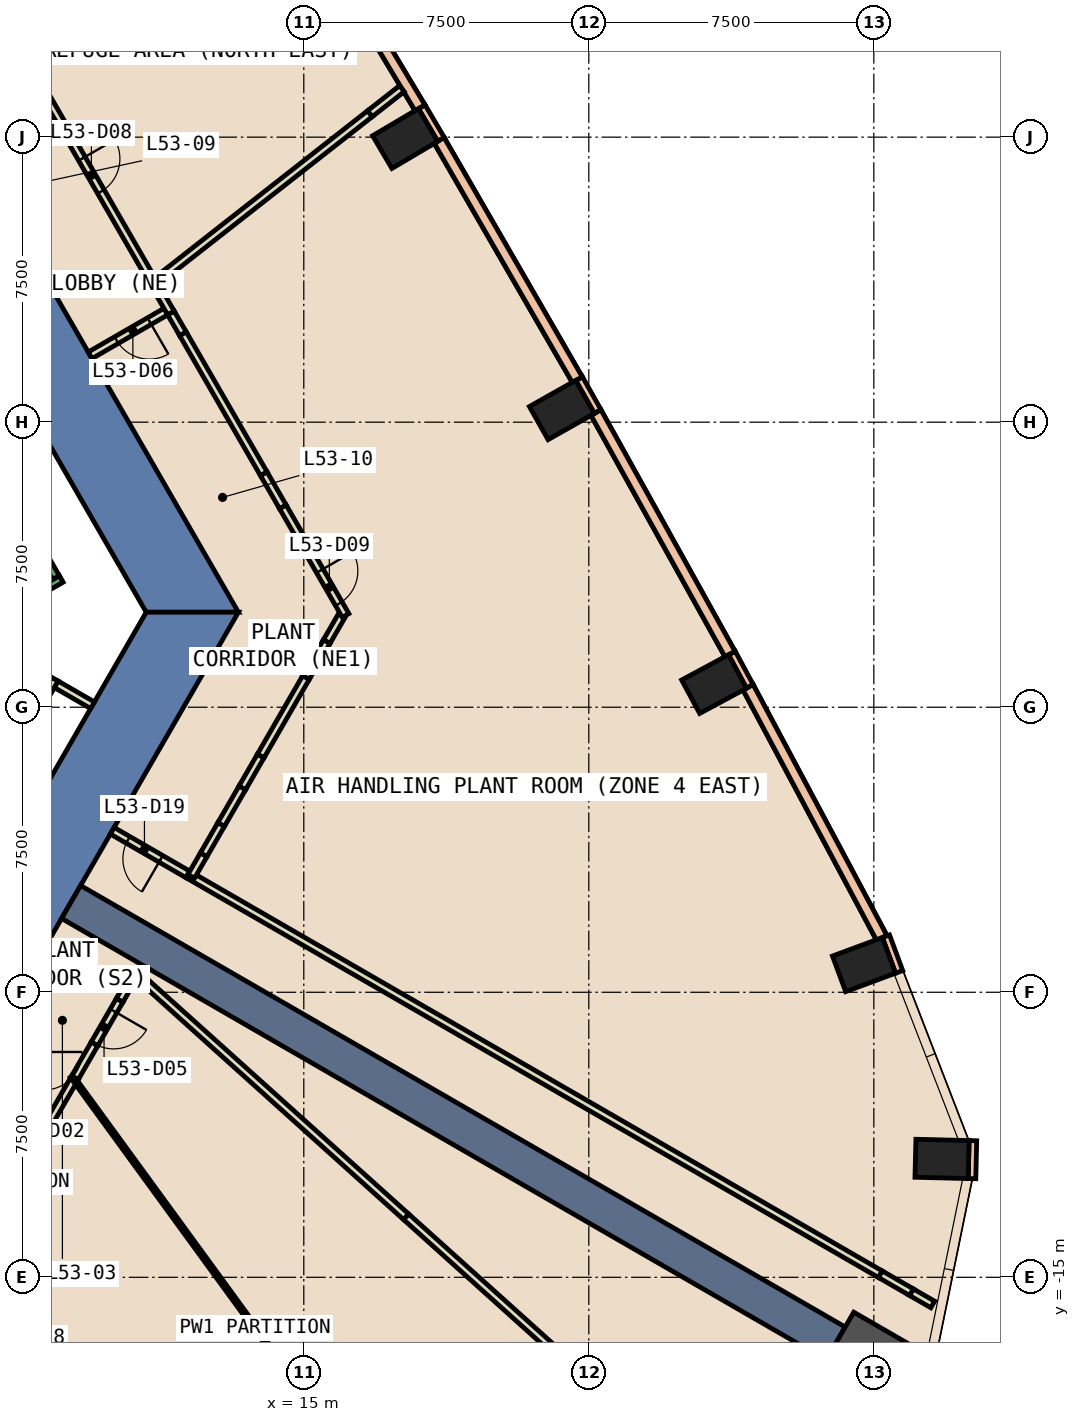
"""IFC4 building model, lengths in metres.
Left out: names, types, materials, properties, quantities, classifications, styles, units other than length and angle.
Written with IfcOpenShell. Run it as: python <this file> out.ifc"""

import sys

from ifc_helpers import new_model, si_unit, direction, frame, frame_2d, origin, origin_2d, place, context, subcontext, project, spatial, polyline, rectangle, outline, extrude, element, fill, save


model = new_model("IFC4")
c1 = context("Model", 3, precision=1e-05, world=origin(), true_north=direction((0.0, 1.0)))
c2 = subcontext(c1, "Body", "Model", "MODEL_VIEW")
j1 = project(units=[si_unit("LENGTHUNIT", "METRE"), si_unit("PLANEANGLEUNIT", "RADIAN")], contexts=[c1])
p1 = place(None, origin())
s1 = spatial("IfcSite", under=j1, at=p1, CompositionType="ELEMENT")
p2 = place(p1, origin())
s2 = spatial("IfcBuilding", under=s1, at=p2, CompositionType="ELEMENT")
p3 = place(p2, frame((0.0, 0.0, 236.0)))
s3 = spatial("IfcBuildingStorey", under=s2, at=p3, CompositionType="ELEMENT", Elevation=236.0)
p4 = place(p3, frame((29.82, -17.216, -0.6), z_axis=(0.0, 0.0, 1.0), x_axis=(-0.866025403784, 0.5, 0.0)))
e1 = element("IfcColumn", 1, at=p4, inside=s3, PredefinedType="COLUMN", context=c2, shape_type="SweptSolid", body=[
    extrude(rectangle(XDim=1.9, YDim=1.9, at=origin_2d()), origin(), (0.0, 0.0, 1.0), 5.4),
])
for number, where, z_axis, x_axis in (
    (2, (31.795, -11.885, -0.6), (0.0, 0.0, 1.0), (0.025, 1.0, 0.0)),
    (3, (29.742, -6.772, -0.6), (0.0, 0.0, 1.0), (-0.347, 0.938, 0.0)),
    (4, (25.797, 0.608, -0.6), (0.0, 0.0, 1.0), (-0.474, 0.88, 0.0)),
    (5, (21.792, 7.82, -0.6), (0.0, 0.0, 1.0), (-0.491, 0.871, 0.0)),
    (6, (17.668, 14.963, -0.6), (0.0, 0.0, 1.0), (-0.509, 0.861, 0.0)),
):
    element("IfcColumn", number, at=place(p3, frame(where, z_axis=z_axis, x_axis=x_axis)), inside=s3, PredefinedType="COLUMN", context=c2, shape_type="SweptSolid", body=[
        extrude(rectangle(XDim=1.0, YDim=1.4, at=origin_2d()), origin(), (0.0, 0.0, 1.0), 5.4),
    ])
p5 = place(p3, frame((0.0, 0.0, -0.6)))
e7 = element("IfcWall", 7, at=p5, inside=s3, PredefinedType="SHEAR", context=c2, shape_type="SweptSolid", body=[
    extrude(outline(polyline([(8.085, 11.498), (6.266, 10.447), (10.854, 2.5), (13.279, 2.5), (8.085, 11.498)])), origin(), (0.0, 0.0, 1.0), 5.4),
])
p6 = place(p3, frame((0.0, 0.0, -0.6)))
e8 = element("IfcWall", 8, at=p6, inside=s3, PredefinedType="SHEAR", context=c2, shape_type="SweptSolid", body=[
    extrude(outline(polyline([(6.64, -9.0), (13.279, 2.5), (10.854, 2.5), (5.427, -6.9), (6.64, -9.0)])), origin(), (0.0, 0.0, 1.0), 5.4),
])
p7 = place(p3, frame((8.877, -5.125, 0.0), z_axis=(0.0, 0.0, 1.0), x_axis=(0.866032640494, -0.499987465442, 0.0)))
e9 = element("IfcWall", 9, at=p7, inside=s3, PredefinedType="SHEAR", context=c2, shape_type="SweptSolid", body=[
    extrude(rectangle(XDim=23.232, YDim=1.0, at=frame_2d((11.616, 0.0))), origin(), (0.0, 0.0, 1.0), 4.8),
])
for number, where, z_axis, x_axis in (
    (10, (30.666, -6.964, 0.0), (0.0, 0.0, 1.0), (-0.347, 0.938, 0.0)),
    (11, (26.738, 0.547, 0.0), (0.0, 0.0, 1.0), (-0.474, 0.881, 0.0)),
    (12, (22.735, 7.777, 0.0), (0.0, 0.0, 1.0), (-0.492, 0.871, 0.0)),
):
    element("IfcWall", number, at=place(p3, frame(where, z_axis=z_axis, x_axis=x_axis)), inside=s3, PredefinedType="STANDARD", context=c2, shape_type="SweptSolid", body=[
        extrude(rectangle(XDim=1.0, YDim=0.2, at=frame_2d((0.5, 0.0))), origin(), (0.0, 0.0, 1.0), 4.8),
    ])
p8 = place(p3, frame((18.611, 14.94, 0.0), z_axis=(0.0, 0.0, 1.0), x_axis=(-0.508161541526, 0.861261776531, 0.0)))
e13 = element("IfcWall", 13, at=p8, inside=s3, PredefinedType="STANDARD", context=c2, shape_type="SweptSolid", body=[
    extrude(rectangle(XDim=1.0, YDim=0.2, at=frame_2d((0.5, 0.0))), origin(), (0.0, 0.0, 1.0), 4.8),
])
p9 = place(p3, frame((32.583, -12.404, 0.0), z_axis=(0.0, 0.0, 1.0), x_axis=(0.023942303888, 0.999713341956, 0.0)))
e14 = element("IfcWall", 14, at=p9, inside=s3, PredefinedType="STANDARD", context=c2, shape_type="SweptSolid", body=[
    extrude(rectangle(XDim=0.999, YDim=0.2, at=frame_2d((0.5, 0.0))), origin(), (0.0, 0.0, 1.0), 4.8),
])
p10 = place(p3, frame((30.207, -6.068, 0.0), z_axis=(0.0, 0.0, 1.0), x_axis=(-0.470523779067, 0.882387314807, 0.0)))
e15 = element("IfcWall", 15, at=p10, inside=s3, PredefinedType="STANDARD", context=c2, shape_type="SweptSolid", body=[
    extrude(rectangle(XDim=7.471, YDim=0.3, at=frame_2d((3.735, 0.0))), origin(), (0.0, 0.0, 1.0), 1.2),
])
p11 = place(p3, frame((30.207, -6.068, 4.0), z_axis=(0.0, 0.0, 1.0), x_axis=(-0.470523779067, 0.882387314807, 0.0)))
e16 = element("IfcWall", 16, at=p11, inside=s3, PredefinedType="STANDARD", context=c2, shape_type="SweptSolid", body=[
    extrude(rectangle(XDim=7.471, YDim=0.3, at=frame_2d((3.735, 0.0))), origin(), (0.0, 0.0, 1.0), 0.8),
])
p12 = place(p3, frame((26.215, 1.4, 0.0), z_axis=(0.0, 0.0, 1.0), x_axis=(-0.485451767121, 0.874263451025, 0.0)))
e17 = element("IfcWall", 17, at=p12, inside=s3, PredefinedType="STANDARD", context=c2, shape_type="SweptSolid", body=[
    extrude(rectangle(XDim=7.266, YDim=0.3, at=frame_2d((3.633, 0.0))), origin(), (0.0, 0.0, 1.0), 1.2),
])
p13 = place(p3, frame((26.215, 1.4, 4.0), z_axis=(0.0, 0.0, 1.0), x_axis=(-0.485451767121, 0.874263451025, 0.0)))
e18 = element("IfcWall", 18, at=p13, inside=s3, PredefinedType="STANDARD", context=c2, shape_type="SweptSolid", body=[
    extrude(rectangle(XDim=7.266, YDim=0.3, at=frame_2d((3.633, 0.0))), origin(), (0.0, 0.0, 1.0), 0.8),
])
p14 = place(p3, frame((22.196, 8.62, 0.0), z_axis=(0.0, 0.0, 1.0), x_axis=(-0.499980331134, 0.866036759312, 0.0)))
e19 = element("IfcWall", 19, at=p14, inside=s3, PredefinedType="STANDARD", context=c2, shape_type="SweptSolid", body=[
    extrude(rectangle(XDim=7.266, YDim=0.3, at=frame_2d((3.633, 0.0))), origin(), (0.0, 0.0, 1.0), 1.2),
])
p15 = place(p3, frame((22.196, 8.62, 4.0), z_axis=(0.0, 0.0, 1.0), x_axis=(-0.499980331134, 0.866036759312, 0.0)))
e20 = element("IfcWall", 20, at=p15, inside=s3, PredefinedType="STANDARD", context=c2, shape_type="SweptSolid", body=[
    extrude(rectangle(XDim=7.266, YDim=0.3, at=frame_2d((3.633, 0.0))), origin(), (0.0, 0.0, 1.0), 0.8),
])
p16 = place(p3, frame((18.057, 15.773, 0.0), z_axis=(0.0, 0.0, 1.0), x_axis=(-0.51437714024, 0.857564083669, 0.0)))
e21 = element("IfcWall", 21, at=p16, inside=s3, PredefinedType="STANDARD", context=c2, shape_type="SweptSolid", body=[
    extrude(rectangle(XDim=7.265, YDim=0.3, at=frame_2d((3.632, 0.0))), origin(), (0.0, 0.0, 1.0), 1.2),
])
p17 = place(p3, frame((18.057, 15.773, 4.0), z_axis=(0.0, 0.0, 1.0), x_axis=(-0.51437714024, 0.857564083669, 0.0)))
e22 = element("IfcWall", 22, at=p17, inside=s3, PredefinedType="STANDARD", context=c2, shape_type="SweptSolid", body=[
    extrude(rectangle(XDim=7.265, YDim=0.3, at=frame_2d((3.632, 0.0))), origin(), (0.0, 0.0, 1.0), 0.8),
])
p18 = place(p3, frame((7.051, -1.687, 0.0), z_axis=(0.0, 0.0, 1.0), x_axis=(0.49994636267, 0.866056369097, 0.0)))
e23 = element("IfcWall", 23, at=p18, inside=s3, PredefinedType="PARTITIONING", context=c2, shape_type="SweptSolid", body=[
    extrude(rectangle(XDim=2.8, YDim=0.2, at=frame_2d((1.4, 0.0))), origin(), (0.0, 0.0, 1.0), 4.8),
])
p19 = place(p3, frame((8.488, 0.602, 0.0), z_axis=(0.0, 0.0, 1.0), x_axis=(0.866063652425, -0.499933745558, 0.0)))
e24 = element("IfcWall", 24, at=p19, inside=s3, PredefinedType="PARTITIONING", context=c2, shape_type="SweptSolid", body=[
    extrude(rectangle(XDim=1.1, YDim=0.2, at=frame_2d((0.55, 0.0))), origin(), (0.0, 0.0, 1.0), 4.8),
])
p20 = place(p3, frame((8.98, -9.747, 0.0), z_axis=(0.0, 0.0, 1.0), x_axis=(-0.499908274205, -0.866078355221, 0.0)))
e25 = element("IfcWall", 25, at=p20, inside=s3, PredefinedType="PARTITIONING", context=c2, shape_type="SweptSolid", body=[
    extrude(rectangle(XDim=1.63, YDim=0.2, at=frame_2d((0.815, 0.0))), origin(), (0.0, 0.0, 1.0), 4.8),
])
p21 = place(p3, frame((10.566, -7.0, 0.0), z_axis=(0.0, 0.0, 1.0), x_axis=(-0.500252895651, -0.86587934517, 0.0)))
e26 = element("IfcWall", 26, at=p21, inside=s3, PredefinedType="PARTITIONING", context=c2, shape_type="SweptSolid", body=[
    extrude(rectangle(XDim=0.823, YDim=0.2, at=frame_2d((0.412, 0.0))), origin(), (0.0, 0.0, 1.0), 2.4),
])
p22 = place(p3, frame((8.896, -9.709, 0.0), z_axis=(0.0, 0.0, 1.0), x_axis=(0.588922600502, -0.808189439808, 0.0)))
e27 = element("IfcWall", 27, at=p22, inside=s3, PredefinedType="PARTITIONING", context=c2, shape_type="SweptSolid", body=[
    extrude(rectangle(XDim=16.369, YDim=0.1, at=frame_2d((8.184, 0.0))), origin(), (0.0, 0.0, 1.0), 4.8),
])
p23 = place(p3, frame((10.492, -6.933, 0.0), z_axis=(0.0, 0.0, 1.0), x_axis=(0.743607411776, -0.668616494825, 0.0)))
e28 = element("IfcWall", 28, at=p23, inside=s3, PredefinedType="PARTITIONING", context=c2, shape_type="SweptSolid", body=[
    extrude(rectangle(XDim=9.685, YDim=0.2, at=frame_2d((4.843, 0.0))), origin(), (0.0, 0.0, 1.0), 2.4),
])
p24 = place(p3, frame((11.951, -4.4, 0.0), z_axis=(0.0, 0.0, 1.0), x_axis=(-0.866053019151, 0.499952165731, 0.0)))
e29 = element("IfcWall", 29, at=p24, inside=s3, PredefinedType="PARTITIONING", context=c2, shape_type="SweptSolid", body=[
    extrude(rectangle(XDim=2.3, YDim=0.2, at=frame_2d((1.15, 0.0))), origin(), (0.0, 0.0, 1.0), 4.8),
])
p25 = place(p24, frame((0.821, 0.0, 0.0)))
e30 = element("IfcOpeningElement", 30, at=p25, cuts=e29, PredefinedType="OPENING", context=c2, shape_type="SweptSolid", body=[
    extrude(rectangle(XDim=1.0, YDim=2.1, at=frame_2d((0.5, 1.05))), frame((0.0, 0.11, 0.0), z_axis=(0.0, -1.0, 0.0), x_axis=(1.0, 0.0, 0.0)), (0.0, 0.0, 1.0), 0.22),
])
p26 = place(p3, frame((11.951, -4.4, 0.0), z_axis=(0.0, 0.0, 1.0), x_axis=(0.866036805702, -0.49998025078, 0.0)))
e31 = element("IfcWall", 31, at=p26, inside=s3, PredefinedType="PARTITIONING", context=c2, shape_type="SweptSolid", body=[
    extrude(rectangle(XDim=21.041, YDim=0.2, at=frame_2d((10.521, 0.0))), origin(), (0.0, 0.0, 1.0), 4.8),
])
p27 = place(p3, frame((11.455, 10.459, 0.0), z_axis=(0.0, 0.0, 1.0), x_axis=(-0.865999212041, -0.500045362686, 0.0)))
e32 = element("IfcWall", 32, at=p27, inside=s3, PredefinedType="PARTITIONING", context=c2, shape_type="SweptSolid", body=[
    extrude(rectangle(XDim=2.4, YDim=0.2, at=frame_2d((1.2, 0.0))), origin(), (0.0, 0.0, 1.0), 2.4),
])
p28 = place(p27, frame((0.6, 0.0, 0.0)))
e33 = element("IfcOpeningElement", 33, at=p28, cuts=e32, PredefinedType="OPENING", context=c2, shape_type="SweptSolid", body=[
    extrude(rectangle(XDim=1.0, YDim=2.1, at=frame_2d((0.5, 1.05))), frame((0.0, 0.11, 0.0), z_axis=(0.0, -1.0, 0.0), x_axis=(1.0, 0.0, 0.0)), (0.0, 0.0, 1.0), 0.22),
])
p29 = place(p3, frame((7.905, 16.608, 0.0), z_axis=(0.0, 0.0, 1.0), x_axis=(0.499957262057, -0.866050077142, 0.0)))
e34 = element("IfcWall", 34, at=p29, inside=s3, PredefinedType="PARTITIONING", context=c2, shape_type="SweptSolid", body=[
    extrude(rectangle(XDim=7.2, YDim=0.2, at=frame_2d((3.6, 0.0))), origin(), (0.0, 0.0, 1.0), 4.8),
])
p30 = place(p29, frame((2.512, 0.0, 0.0)))
e35 = element("IfcOpeningElement", 35, at=p30, cuts=e34, PredefinedType="OPENING", context=c2, shape_type="SweptSolid", body=[
    extrude(rectangle(XDim=1.0, YDim=2.1, at=frame_2d((0.5, 1.05))), frame((0.0, 0.11, 0.0), z_axis=(0.0, -1.0, 0.0), x_axis=(1.0, 0.0, 0.0)), (0.0, 0.0, 1.0), 0.22),
])
p31 = place(p3, frame((11.505, 10.372, 0.0), z_axis=(0.0, 0.0, 1.0), x_axis=(0.500335529221, -0.865831599215, 0.0)))
e36 = element("IfcWall", 36, at=p31, inside=s3, PredefinedType="PARTITIONING", context=c2, shape_type="SweptSolid", body=[
    extrude(rectangle(XDim=0.632, YDim=0.2, at=frame_2d((0.316, 0.0))), origin(), (0.0, 0.0, 1.0), 2.4),
])
p32 = place(p3, frame((16.0, 2.413, 0.0), z_axis=(0.0, 0.0, 1.0), x_axis=(-0.499775670035, -0.866154882016, 0.0)))
e37 = element("IfcWall", 37, at=p32, inside=s3, PredefinedType="PARTITIONING", context=c2, shape_type="SweptSolid", body=[
    extrude(rectangle(XDim=0.794, YDim=0.2, at=frame_2d((0.397, 0.0))), origin(), (0.0, 0.0, 1.0), 4.8),
])
p33 = place(p3, frame((17.581, 16.276, 0.0), z_axis=(0.0, 0.0, 1.0), x_axis=(-0.78699011443, -0.61696560665, 0.0)))
e38 = element("IfcWall", 38, at=p33, inside=s3, PredefinedType="PARTITIONING", context=c2, shape_type="SweptSolid", body=[
    extrude(rectangle(XDim=1.071, YDim=0.2, at=frame_2d((0.536, 0.0))), origin(), (0.0, 0.0, 1.0), 2.4),
])
p34 = place(p3, frame((6.125, 16.309, 0.0), z_axis=(0.0, 0.0, 1.0), x_axis=(0.405480740136, 0.914103587882, 0.0)))
e39 = element("IfcWall", 39, at=p34, inside=s3, PredefinedType="PARTITIONING", context=c2, shape_type="SweptSolid", body=[
    extrude(rectangle(XDim=10.54, YDim=0.2, at=frame_2d((5.27, 0.0))), origin(), (0.0, 0.0, 1.0), 4.8),
])
p35 = place(p3, frame((10.154, -7.713, 0.0), z_axis=(0.0, 0.0, 1.0), x_axis=(-0.500265304803, -0.865872175792, 0.0)))
e40 = element("IfcWall", 40, at=p35, inside=s3, PredefinedType="PARTITIONING", context=c2, shape_type="SweptSolid", body=[
    extrude(rectangle(XDim=1.323, YDim=0.2, at=frame_2d((0.662, 0.0))), origin(), (0.0, 0.0, 1.0), 4.8),
])
p36 = place(p35, frame((0.32, 0.0, 0.0)))
e41 = element("IfcOpeningElement", 41, at=p36, cuts=e40, PredefinedType="OPENING", context=c2, shape_type="SweptSolid", body=[
    extrude(rectangle(XDim=1.0, YDim=2.1, at=frame_2d((0.5, 1.05))), frame((0.0, 0.11, 0.0), z_axis=(0.0, -1.0, 0.0), x_axis=(1.0, 0.0, 0.0)), (0.0, 0.0, 1.0), 0.22),
])
p37 = place(p3, frame((9.492, -8.859, 0.0), z_axis=(0.0, 0.0, 1.0), x_axis=(-0.499392554388, -0.866375828738, 0.0)))
e42 = element("IfcWall", 42, at=p37, inside=s3, PredefinedType="PARTITIONING", context=c2, shape_type="SweptSolid", body=[
    extrude(rectangle(XDim=1.025, YDim=0.2, at=frame_2d((0.513, 0.0))), origin(), (0.0, 0.0, 1.0), 2.4),
])
p38 = place(p3, frame((17.694, -13.409, 0.0), z_axis=(0.0, 0.0, 1.0), x_axis=(0.743600848277, -0.668623794403, 0.0)))
e43 = element("IfcWall", 43, at=p38, inside=s3, PredefinedType="PARTITIONING", context=c2, shape_type="SweptSolid", body=[
    extrude(rectangle(XDim=11.159, YDim=0.2, at=frame_2d((5.58, 0.0))), origin(), (0.0, 0.0, 1.0), 4.8),
])
p39 = place(p3, frame((30.173, -14.92, 0.0), z_axis=(0.0, 0.0, 1.0), x_axis=(0.866108284413, -0.499856419056, 0.0)))
e44 = element("IfcWall", 44, at=p39, inside=s3, PredefinedType="PARTITIONING", context=c2, shape_type="SweptSolid", body=[
    extrude(rectangle(XDim=0.947, YDim=0.2, at=frame_2d((0.473, 0.0))), origin(), (0.0, 0.0, 1.0), 2.4),
])
p40 = place(p3, frame((30.993, -15.393, 0.0), z_axis=(0.0, 0.0, 1.0), x_axis=(0.865781063021, -0.500422972009, 0.0)))
e45 = element("IfcWall", 45, at=p40, inside=s3, PredefinedType="PARTITIONING", context=c2, shape_type="SweptSolid", body=[
    extrude(rectangle(XDim=0.644, YDim=0.2, at=frame_2d((0.322, 0.0))), origin(), (0.0, 0.0, 1.0), 4.8),
])
p41 = place(p3, frame((11.821, 9.825, 0.0), z_axis=(0.0, 0.0, 1.0), x_axis=(0.500015573243, -0.866016412382, 0.0)))
e46 = element("IfcWall", 46, at=p41, inside=s3, PredefinedType="PARTITIONING", context=c2, shape_type="SweptSolid", body=[
    extrude(rectangle(XDim=4.254, YDim=0.2, at=frame_2d((2.127, 0.0))), origin(), (0.0, 0.0, 1.0), 4.8),
])
p42 = place(p3, frame((13.948, 6.141, 0.0), z_axis=(0.0, 0.0, 1.0), x_axis=(0.499694399542, -0.866201770413, 0.0)))
e47 = element("IfcWall", 47, at=p42, inside=s3, PredefinedType="PARTITIONING", context=c2, shape_type="SweptSolid", body=[
    extrude(rectangle(XDim=1.005, YDim=0.2, at=frame_2d((0.502, 0.0))), origin(), (0.0, 0.0, 1.0), 2.4),
])
p43 = place(p3, frame((14.45, 5.271, 0.0), z_axis=(0.0, 0.0, 1.0), x_axis=(0.50002983664, -0.866008176907, 0.0)))
e48 = element("IfcWall", 48, at=p43, inside=s3, PredefinedType="PARTITIONING", context=c2, shape_type="SweptSolid", body=[
    extrude(rectangle(XDim=3.3, YDim=0.2, at=frame_2d((1.65, 0.0))), origin(), (0.0, 0.0, 1.0), 4.8),
])
p44 = place(p43, frame((1.944, 0.0, 0.0)))
e49 = element("IfcOpeningElement", 49, at=p44, cuts=e48, PredefinedType="OPENING", context=c2, shape_type="SweptSolid", body=[
    extrude(rectangle(XDim=1.0, YDim=2.1, at=frame_2d((0.5, 1.05))), frame((0.0, 0.11, 0.0), z_axis=(0.0, -1.0, 0.0), x_axis=(1.0, 0.0, 0.0)), (0.0, 0.0, 1.0), 0.22),
])
p45 = place(p3, frame((15.603, 1.725, 0.0), z_axis=(0.0, 0.0, 1.0), x_axis=(-0.500348398615, -0.865824162289, 0.0)))
e50 = element("IfcWall", 50, at=p45, inside=s3, PredefinedType="PARTITIONING", context=c2, shape_type="SweptSolid", body=[
    extrude(rectangle(XDim=1.092, YDim=0.2, at=frame_2d((0.546, 0.0))), origin(), (0.0, 0.0, 1.0), 2.4),
])
p46 = place(p3, frame((15.057, 0.78, 0.0), z_axis=(0.0, 0.0, 1.0), x_axis=(-0.499905644439, -0.86607987314, 0.0)))
e51 = element("IfcWall", 51, at=p46, inside=s3, PredefinedType="PARTITIONING", context=c2, shape_type="SweptSolid", body=[
    extrude(rectangle(XDim=2.384, YDim=0.2, at=frame_2d((1.192, 0.0))), origin(), (0.0, 0.0, 1.0), 4.8),
])
p47 = place(p3, frame((13.865, -1.285, 0.0), z_axis=(0.0, 0.0, 1.0), x_axis=(-0.499555159482, -0.866282080292, 0.0)))
e52 = element("IfcWall", 52, at=p47, inside=s3, PredefinedType="PARTITIONING", context=c2, shape_type="SweptSolid", body=[
    extrude(rectangle(XDim=0.969, YDim=0.2, at=frame_2d((0.484, 0.0))), origin(), (0.0, 0.0, 1.0), 2.4),
])
p48 = place(p3, frame((13.381, -2.124, 0.0), z_axis=(0.0, 0.0, 1.0), x_axis=(-0.500431039639, -0.865776399866, 0.0)))
e53 = element("IfcWall", 53, at=p48, inside=s3, PredefinedType="PARTITIONING", context=c2, shape_type="SweptSolid", body=[
    extrude(rectangle(XDim=1.113, YDim=0.2, at=frame_2d((0.557, 0.0))), origin(), (0.0, 0.0, 1.0), 4.8),
])
p49 = place(p3, frame((12.824, -3.088, 0.0), z_axis=(0.0, 0.0, 1.0), x_axis=(-0.499454108712, -0.866340344952, 0.0)))
e54 = element("IfcWall", 54, at=p49, inside=s3, PredefinedType="PARTITIONING", context=c2, shape_type="SweptSolid", body=[
    extrude(rectangle(XDim=0.919, YDim=0.2, at=frame_2d((0.459, 0.0))), origin(), (0.0, 0.0, 1.0), 2.4),
])
p50 = place(p3, frame((12.365, -3.884, 0.0), z_axis=(0.0, 0.0, 1.0), x_axis=(-0.500196687681, -0.865911816314, 0.0)))
e55 = element("IfcWall", 55, at=p50, inside=s3, PredefinedType="PARTITIONING", context=c2, shape_type="SweptSolid", body=[
    extrude(rectangle(XDim=0.654, YDim=0.2, at=frame_2d((0.327, 0.0))), origin(), (0.0, 0.0, 1.0), 4.8),
])
p51 = place(p3, frame((16.738, 15.615, 0.0), z_axis=(0.0, 0.0, 1.0), x_axis=(-0.787145477979, -0.616767376323, 0.0)))
e56 = element("IfcWall", 56, at=p51, inside=s3, PredefinedType="PARTITIONING", context=c2, shape_type="SweptSolid", body=[
    extrude(rectangle(XDim=7.225, YDim=0.2, at=frame_2d((3.612, 0.0))), origin(), (0.0, 0.0, 1.0), 4.8),
])
p52 = place(p3, frame((4.806, 1.176, 0.0), z_axis=(0.0, 0.0, 1.0), x_axis=(0.866059941101, 0.499940174841, 0.0)))
e57 = element("IfcWall", 57, at=p52, inside=s3, PredefinedType="STANDARD", context=c2, shape_type="SweptSolid", body=[
    extrude(rectangle(XDim=4.4, YDim=0.2, at=frame_2d((2.2, 0.0))), origin(), (0.0, 0.0, 1.0), 4.8),
])
p53 = place(p52, frame((2.4, 0.0, 0.0)))
e58 = element("IfcOpeningElement", 58, at=p53, cuts=e57, PredefinedType="OPENING", context=c2, shape_type="SweptSolid", body=[
    extrude(rectangle(XDim=1.1, YDim=2.2, at=frame_2d((0.55, 1.1))), frame((0.0, 0.11, 0.0), z_axis=(0.0, -1.0, 0.0), x_axis=(1.0, 0.0, 0.0)), (0.0, 0.0, 1.0), 0.22),
])
p54 = place(p3, frame((8.48, 3.412, 0.0), z_axis=(0.0, 0.0, 1.0), x_axis=(-0.499978703459, 0.866037698999, 0.0)))
e59 = element("IfcWall", 59, at=p54, inside=s3, PredefinedType="STANDARD", context=c2, shape_type="SweptSolid", body=[
    extrude(rectangle(XDim=6.9, YDim=0.2, at=frame_2d((3.45, 0.0))), origin(), (0.0, 0.0, 1.0), 4.8),
])
p55 = place(p36, origin())
e60 = element("IfcDoor", 60, at=p55, inside=s3, OperationType="SINGLE_SWING_LEFT", PredefinedType="DOOR", context=c2, shape_type="SweptSolid", body=[
    extrude(rectangle(XDim=1.0, YDim=2.1, at=frame_2d((0.5, 1.05))), frame((0.0, 0.025, 0.0), z_axis=(0.0, -1.0, 0.0), x_axis=(1.0, 0.0, 0.0)), (0.0, 0.0, 1.0), 0.05),
])
fill(e41, e60)
p56 = place(p28, origin())
e61 = element("IfcDoor", 61, at=p56, inside=s3, OperationType="SINGLE_SWING_RIGHT", PredefinedType="DOOR", context=c2, shape_type="SweptSolid", body=[
    extrude(rectangle(XDim=1.0, YDim=2.1, at=frame_2d((0.5, 1.05))), frame((0.0, 0.025, 0.0), z_axis=(0.0, -1.0, 0.0), x_axis=(1.0, 0.0, 0.0)), (0.0, 0.0, 1.0), 0.05),
])
fill(e33, e61)
p57 = place(p30, origin())
e62 = element("IfcDoor", 62, at=p57, inside=s3, OperationType="SINGLE_SWING_RIGHT", PredefinedType="DOOR", context=c2, shape_type="SweptSolid", body=[
    extrude(rectangle(XDim=1.0, YDim=2.1, at=frame_2d((0.5, 1.05))), frame((0.0, 0.025, 0.0), z_axis=(0.0, -1.0, 0.0), x_axis=(1.0, 0.0, 0.0)), (0.0, 0.0, 1.0), 0.05),
])
fill(e35, e62)
p58 = place(p44, origin())
e63 = element("IfcDoor", 63, at=p58, inside=s3, OperationType="SINGLE_SWING_LEFT", PredefinedType="DOOR", context=c2, shape_type="SweptSolid", body=[
    extrude(rectangle(XDim=1.0, YDim=2.1, at=frame_2d((0.5, 1.05))), frame((0.0, 0.025, 0.0), z_axis=(0.0, -1.0, 0.0), x_axis=(1.0, 0.0, 0.0)), (0.0, 0.0, 1.0), 0.05),
])
fill(e49, e63)
p59 = place(p25, origin())
e64 = element("IfcDoor", 64, at=p59, inside=s3, OperationType="SINGLE_SWING_LEFT", PredefinedType="DOOR", context=c2, shape_type="SweptSolid", body=[
    extrude(rectangle(XDim=1.0, YDim=2.1, at=frame_2d((0.5, 1.05))), frame((0.0, 0.025, 0.0), z_axis=(0.0, -1.0, 0.0), x_axis=(1.0, 0.0, 0.0)), (0.0, 0.0, 1.0), 0.05),
])
fill(e30, e64)
save(model, sys.argv[1])
